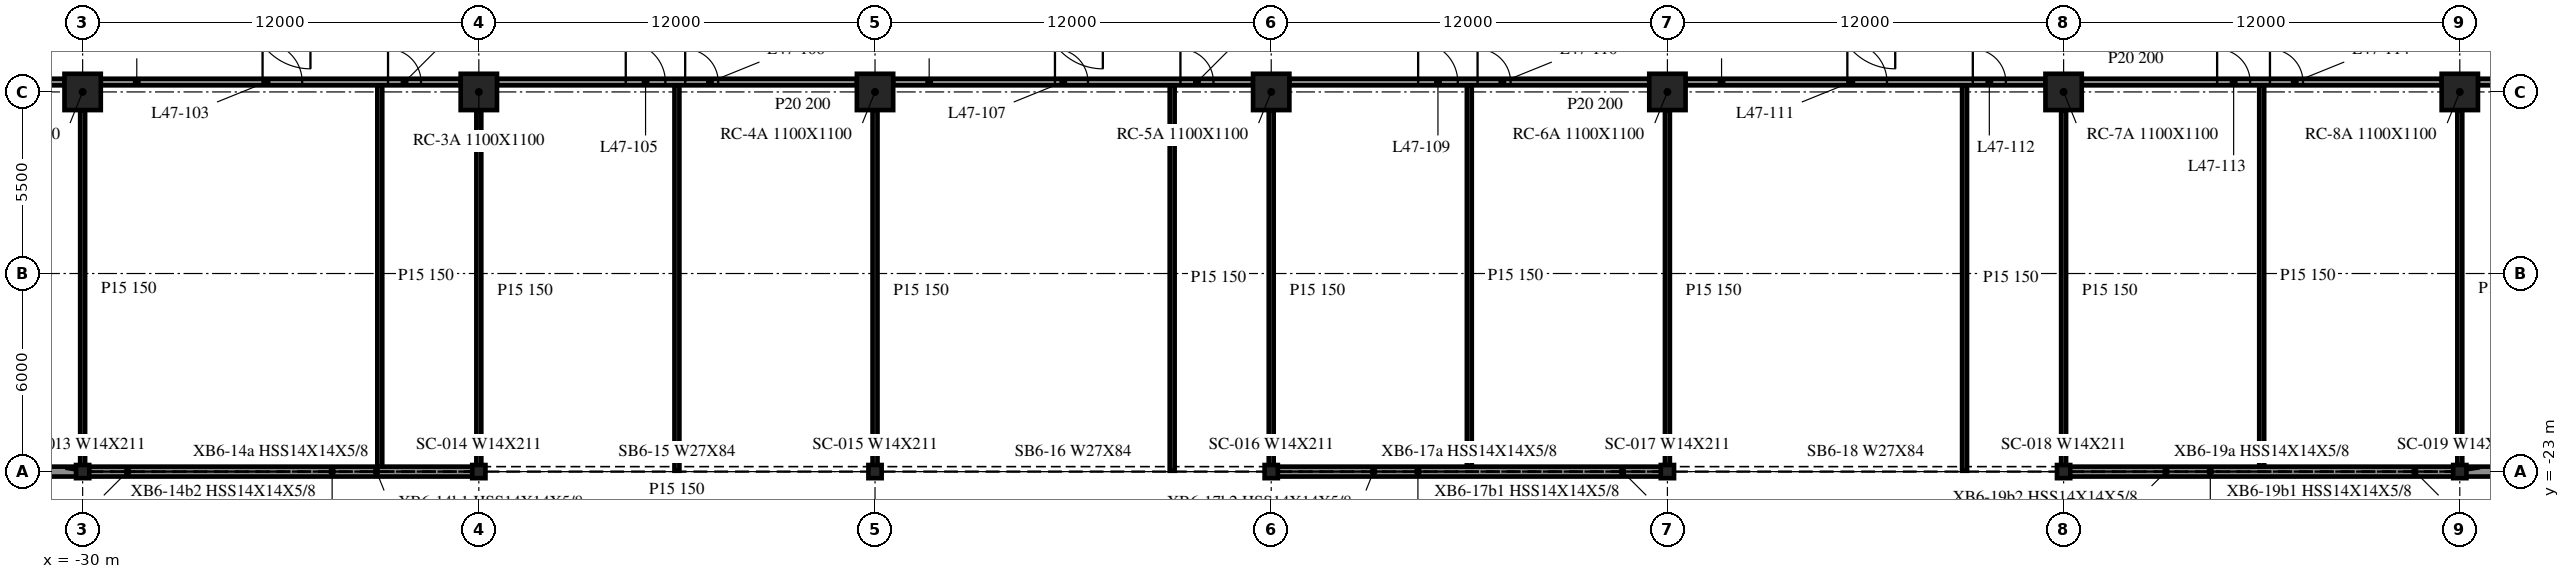
"""IFC4 building model, lengths in metres.
Left out: names, types, materials, properties, quantities, classifications, styles, units other than length and angle.
Written with IfcOpenShell. Run it as: python <this file> out.ifc"""

import sys

from ifc_helpers import new_model, si_unit, direction, frame, frame_2d, origin, origin_2d, place, context, subcontext, project, spatial, rectangle, i_section, extrude, element, fill, save


model = new_model("IFC4")
c1 = context("Model", 3, precision=1e-05, world=origin(), true_north=direction((0.0, 1.0)))
c2 = subcontext(c1, "Body", "Model", "MODEL_VIEW")
j1 = project(units=[si_unit("LENGTHUNIT", "METRE"), si_unit("PLANEANGLEUNIT", "RADIAN")], contexts=[c1])
p1 = place(None, origin())
s1 = spatial("IfcSite", under=j1, at=p1, CompositionType="ELEMENT")
p2 = place(p1, origin())
s2 = spatial("IfcBuilding", under=s1, at=p2, CompositionType="ELEMENT")
p3 = place(p2, frame((0.0, 0.0, 197.7)))
s3 = spatial("IfcBuildingStorey", under=s2, at=p3, CompositionType="ELEMENT", Elevation=197.7)
for number, where, z_axis, x_axis in (
    (1, (-30.0, -11.5, -0.34), (0.0, 0.0, 1.0), (1.0, 0.0, 0.0)),
    (2, (-18.0, -11.5, -0.34), (0.0, 0.0, 1.0), (1.0, 0.0, 0.0)),
    (3, (-6.0, -11.5, -0.34), (0.0, 0.0, 1.0), (1.0, 0.0, 0.0)),
    (4, (6.0, -11.5, -0.34), (0.0, 0.0, 1.0), (1.0, 0.0, 0.0)),
    (5, (18.0, -11.5, -0.34), (0.0, 0.0, 1.0), (1.0, 0.0, 0.0)),
    (6, (30.0, -11.5, -0.34), (0.0, 0.0, 1.0), (1.0, 0.0, 0.0)),
    (7, (42.0, -11.5, -0.34), (0.0, 0.0, 1.0), (1.0, 0.0, 0.0)),
):
    element("IfcColumn", number, at=place(p3, frame(where, z_axis=z_axis, x_axis=x_axis)), inside=s3, PredefinedType="COLUMN", context=c2, shape_type="SweptSolid", body=[
        extrude(rectangle(XDim=1.1, YDim=1.1, at=origin_2d()), origin(), (0.0, 0.0, 1.0), 3.8),
    ])
for number, where, z_axis, x_axis in (
    (8, (-30.0, -23.0, -0.34), (0.0, 0.0, 1.0), (1.0, 0.0, 0.0)),
    (9, (-18.0, -23.0, -0.34), (0.0, 0.0, 1.0), (1.0, 0.0, 0.0)),
    (10, (-6.0, -23.0, -0.34), (0.0, 0.0, 1.0), (1.0, 0.0, 0.0)),
    (11, (6.0, -23.0, -0.34), (0.0, 0.0, 1.0), (1.0, 0.0, 0.0)),
    (12, (18.0, -23.0, -0.34), (0.0, 0.0, 1.0), (1.0, 0.0, 0.0)),
    (13, (30.0, -23.0, -0.34), (0.0, 0.0, 1.0), (1.0, 0.0, 0.0)),
    (14, (42.0, -23.0, -0.34), (0.0, 0.0, 1.0), (1.0, 0.0, 0.0)),
):
    element("IfcColumn", number, at=place(p3, frame(where, z_axis=z_axis, x_axis=x_axis)), inside=s3, PredefinedType="COLUMN", context=c2, shape_type="SweptSolid", body=[
        extrude(i_section(OverallWidth=0.401, OverallDepth=0.399, WebThickness=0.025, FlangeThickness=0.04, at=origin_2d()), origin(), (0.0, 0.0, 1.0), 3.8),
    ])
p4 = place(p3, frame((-36.0, -23.0, 0.0), z_axis=(0.0, 0.0, 1.0), x_axis=(1.0, 0.0, 0.0)))
e15 = element("IfcWall", 15, at=p4, inside=s3, PredefinedType="NOTDEFINED", context=c2, shape_type="SweptSolid", body=[
    extrude(rectangle(XDim=5.988, YDim=0.3, at=frame_2d((2.994, 0.0))), origin(), (0.0, 0.0, 1.0), 2.782),
])
for number, where, z_axis, x_axis in (
    (16, (-29.988, -23.0, 0.0), (0.0, 0.0, 1.0), (1.0, 0.0, 0.0)),
    (17, (6.012, -23.0, 0.0), (0.0, 0.0, 1.0), (1.0, 0.0, 0.0)),
    (18, (30.012, -23.0, 0.0), (0.0, 0.0, 1.0), (1.0, 0.0, 0.0)),
):
    element("IfcWall", number, at=place(p3, frame(where, z_axis=z_axis, x_axis=x_axis)), inside=s3, PredefinedType="NOTDEFINED", context=c2, shape_type="SweptSolid", body=[
        extrude(rectangle(XDim=11.975, YDim=0.3, at=frame_2d((5.988, 0.0))), origin(), (0.0, 0.0, 1.0), 2.782),
    ])
p5 = place(p3, frame((42.012, -23.0, 0.0), z_axis=(0.0, 0.0, 1.0), x_axis=(1.0, 0.0, 0.0)))
e19 = element("IfcWall", 19, at=p5, inside=s3, PredefinedType="NOTDEFINED", context=c2, shape_type="SweptSolid", body=[
    extrude(rectangle(XDim=5.988, YDim=0.3, at=frame_2d((2.994, 0.0))), origin(), (0.0, 0.0, 1.0), 2.782),
])
p6 = place(p3, frame((-41.45, -11.2, 0.0), z_axis=(0.0, 0.0, 1.0), x_axis=(1.0, 0.0, 0.0)))
e20 = element("IfcWall", 20, at=p6, inside=s3, PredefinedType="PARTITIONING", context=c2, shape_type="SweptSolid", body=[
    extrude(rectangle(XDim=10.9, YDim=0.2, at=frame_2d((5.45, 0.0))), origin(), (0.0, 0.0, 1.0), 3.46),
])
p7 = place(p6, frame((4.1, 0.0, 0.0)))
e21 = element("IfcOpeningElement", 21, at=p7, cuts=e20, PredefinedType="OPENING", context=c2, shape_type="SweptSolid", body=[
    extrude(rectangle(XDim=1.0, YDim=2.1, at=frame_2d((0.5, 1.05))), frame((0.0, 0.11, 0.0), z_axis=(0.0, -1.0, 0.0), x_axis=(1.0, 0.0, 0.0)), (0.0, 0.0, 1.0), 0.22),
])
p8 = place(p6, frame((5.7, 0.0, 0.0)))
e22 = element("IfcOpeningElement", 22, at=p8, cuts=e20, PredefinedType="OPENING", context=c2, shape_type="SweptSolid", body=[
    extrude(rectangle(XDim=1.0, YDim=2.1, at=frame_2d((0.5, 1.05))), frame((0.0, 0.11, 0.0), z_axis=(0.0, -1.0, 0.0), x_axis=(1.0, 0.0, 0.0)), (0.0, 0.0, 1.0), 0.22),
])
p9 = place(p3, frame((-29.45, -11.2, 0.0), z_axis=(0.0, 0.0, 1.0), x_axis=(1.0, 0.0, 0.0)))
e23 = element("IfcWall", 23, at=p9, inside=s3, PredefinedType="PARTITIONING", context=c2, shape_type="SweptSolid", body=[
    extrude(rectangle(XDim=10.9, YDim=0.2, at=frame_2d((5.45, 0.0))), origin(), (0.0, 0.0, 1.0), 3.46),
])
p10 = place(p9, frame((4.9, 0.0, 0.0)))
e24 = element("IfcOpeningElement", 24, at=p10, cuts=e23, PredefinedType="OPENING", context=c2, shape_type="SweptSolid", body=[
    extrude(rectangle(XDim=1.2, YDim=2.1, at=frame_2d((0.6, 1.05))), frame((0.0, 0.11, 0.0), z_axis=(0.0, -1.0, 0.0), x_axis=(1.0, 0.0, 0.0)), (0.0, 0.0, 1.0), 0.22),
])
p11 = place(p9, frame((8.7, 0.0, 0.0)))
e25 = element("IfcOpeningElement", 25, at=p11, cuts=e23, PredefinedType="OPENING", context=c2, shape_type="SweptSolid", body=[
    extrude(rectangle(XDim=1.0, YDim=2.1, at=frame_2d((0.5, 1.05))), frame((0.0, 0.11, 0.0), z_axis=(0.0, -1.0, 0.0), x_axis=(1.0, 0.0, 0.0)), (0.0, 0.0, 1.0), 0.22),
])
p12 = place(p3, frame((-17.45, -11.2, 0.0), z_axis=(0.0, 0.0, 1.0), x_axis=(1.0, 0.0, 0.0)))
e26 = element("IfcWall", 26, at=p12, inside=s3, PredefinedType="PARTITIONING", context=c2, shape_type="SweptSolid", body=[
    extrude(rectangle(XDim=10.9, YDim=0.2, at=frame_2d((5.45, 0.0))), origin(), (0.0, 0.0, 1.0), 3.46),
])
p13 = place(p12, frame((3.9, 0.0, 0.0)))
e27 = element("IfcOpeningElement", 27, at=p13, cuts=e26, PredefinedType="OPENING", context=c2, shape_type="SweptSolid", body=[
    extrude(rectangle(XDim=1.2, YDim=2.1, at=frame_2d((0.6, 1.05))), frame((0.0, 0.11, 0.0), z_axis=(0.0, -1.0, 0.0), x_axis=(1.0, 0.0, 0.0)), (0.0, 0.0, 1.0), 0.22),
])
p14 = place(p12, frame((5.7, 0.0, 0.0)))
e28 = element("IfcOpeningElement", 28, at=p14, cuts=e26, PredefinedType="OPENING", context=c2, shape_type="SweptSolid", body=[
    extrude(rectangle(XDim=1.0, YDim=2.1, at=frame_2d((0.5, 1.05))), frame((0.0, 0.11, 0.0), z_axis=(0.0, -1.0, 0.0), x_axis=(1.0, 0.0, 0.0)), (0.0, 0.0, 1.0), 0.22),
])
p15 = place(p3, frame((-5.45, -11.2, 0.0), z_axis=(0.0, 0.0, 1.0), x_axis=(1.0, 0.0, 0.0)))
e29 = element("IfcWall", 29, at=p15, inside=s3, PredefinedType="PARTITIONING", context=c2, shape_type="SweptSolid", body=[
    extrude(rectangle(XDim=10.9, YDim=0.2, at=frame_2d((5.45, 0.0))), origin(), (0.0, 0.0, 1.0), 3.46),
])
p16 = place(p15, frame((4.9, 0.0, 0.0)))
e30 = element("IfcOpeningElement", 30, at=p16, cuts=e29, PredefinedType="OPENING", context=c2, shape_type="SweptSolid", body=[
    extrude(rectangle(XDim=1.0, YDim=2.1, at=frame_2d((0.5, 1.05))), frame((0.0, 0.11, 0.0), z_axis=(0.0, -1.0, 0.0), x_axis=(1.0, 0.0, 0.0)), (0.0, 0.0, 1.0), 0.22),
])
p17 = place(p15, frame((8.7, 0.0, 0.0)))
e31 = element("IfcOpeningElement", 31, at=p17, cuts=e29, PredefinedType="OPENING", context=c2, shape_type="SweptSolid", body=[
    extrude(rectangle(XDim=1.0, YDim=2.1, at=frame_2d((0.5, 1.05))), frame((0.0, 0.11, 0.0), z_axis=(0.0, -1.0, 0.0), x_axis=(1.0, 0.0, 0.0)), (0.0, 0.0, 1.0), 0.22),
])
p18 = place(p3, frame((6.55, -11.2, 0.0), z_axis=(0.0, 0.0, 1.0), x_axis=(1.0, 0.0, 0.0)))
e32 = element("IfcWall", 32, at=p18, inside=s3, PredefinedType="PARTITIONING", context=c2, shape_type="SweptSolid", body=[
    extrude(rectangle(XDim=10.9, YDim=0.2, at=frame_2d((5.45, 0.0))), origin(), (0.0, 0.0, 1.0), 3.46),
])
p19 = place(p18, frame((3.9, 0.0, 0.0)))
e33 = element("IfcOpeningElement", 33, at=p19, cuts=e32, PredefinedType="OPENING", context=c2, shape_type="SweptSolid", body=[
    extrude(rectangle(XDim=1.2, YDim=2.1, at=frame_2d((0.6, 1.05))), frame((0.0, 0.11, 0.0), z_axis=(0.0, -1.0, 0.0), x_axis=(1.0, 0.0, 0.0)), (0.0, 0.0, 1.0), 0.22),
])
p20 = place(p18, frame((5.7, 0.0, 0.0)))
e34 = element("IfcOpeningElement", 34, at=p20, cuts=e32, PredefinedType="OPENING", context=c2, shape_type="SweptSolid", body=[
    extrude(rectangle(XDim=1.0, YDim=2.1, at=frame_2d((0.5, 1.05))), frame((0.0, 0.11, 0.0), z_axis=(0.0, -1.0, 0.0), x_axis=(1.0, 0.0, 0.0)), (0.0, 0.0, 1.0), 0.22),
])
p21 = place(p3, frame((18.55, -11.2, 0.0), z_axis=(0.0, 0.0, 1.0), x_axis=(1.0, 0.0, 0.0)))
e35 = element("IfcWall", 35, at=p21, inside=s3, PredefinedType="PARTITIONING", context=c2, shape_type="SweptSolid", body=[
    extrude(rectangle(XDim=10.9, YDim=0.2, at=frame_2d((5.45, 0.0))), origin(), (0.0, 0.0, 1.0), 3.46),
])
p22 = place(p21, frame((4.9, 0.0, 0.0)))
e36 = element("IfcOpeningElement", 36, at=p22, cuts=e35, PredefinedType="OPENING", context=c2, shape_type="SweptSolid", body=[
    extrude(rectangle(XDim=1.2, YDim=2.1, at=frame_2d((0.6, 1.05))), frame((0.0, 0.11, 0.0), z_axis=(0.0, -1.0, 0.0), x_axis=(1.0, 0.0, 0.0)), (0.0, 0.0, 1.0), 0.22),
])
p23 = place(p21, frame((8.7, 0.0, 0.0)))
e37 = element("IfcOpeningElement", 37, at=p23, cuts=e35, PredefinedType="OPENING", context=c2, shape_type="SweptSolid", body=[
    extrude(rectangle(XDim=1.0, YDim=2.1, at=frame_2d((0.5, 1.05))), frame((0.0, 0.11, 0.0), z_axis=(0.0, -1.0, 0.0), x_axis=(1.0, 0.0, 0.0)), (0.0, 0.0, 1.0), 0.22),
])
p24 = place(p3, frame((30.55, -11.2, 0.0), z_axis=(0.0, 0.0, 1.0), x_axis=(1.0, 0.0, 0.0)))
e38 = element("IfcWall", 38, at=p24, inside=s3, PredefinedType="PARTITIONING", context=c2, shape_type="SweptSolid", body=[
    extrude(rectangle(XDim=10.9, YDim=0.2, at=frame_2d((5.45, 0.0))), origin(), (0.0, 0.0, 1.0), 3.46),
])
p25 = place(p24, frame((4.1, 0.0, 0.0)))
e39 = element("IfcOpeningElement", 39, at=p25, cuts=e38, PredefinedType="OPENING", context=c2, shape_type="SweptSolid", body=[
    extrude(rectangle(XDim=1.0, YDim=2.1, at=frame_2d((0.5, 1.05))), frame((0.0, 0.11, 0.0), z_axis=(0.0, -1.0, 0.0), x_axis=(1.0, 0.0, 0.0)), (0.0, 0.0, 1.0), 0.22),
])
p26 = place(p24, frame((5.7, 0.0, 0.0)))
e40 = element("IfcOpeningElement", 40, at=p26, cuts=e38, PredefinedType="OPENING", context=c2, shape_type="SweptSolid", body=[
    extrude(rectangle(XDim=1.0, YDim=2.1, at=frame_2d((0.5, 1.05))), frame((0.0, 0.11, 0.0), z_axis=(0.0, -1.0, 0.0), x_axis=(1.0, 0.0, 0.0)), (0.0, 0.0, 1.0), 0.22),
])
p27 = place(p3, frame((42.55, -11.2, 0.0), z_axis=(0.0, 0.0, 1.0), x_axis=(1.0, 0.0, 0.0)))
e41 = element("IfcWall", 41, at=p27, inside=s3, PredefinedType="PARTITIONING", context=c2, shape_type="SweptSolid", body=[
    extrude(rectangle(XDim=11.3, YDim=0.2, at=frame_2d((5.65, 0.0))), origin(), (0.0, 0.0, 1.0), 3.46),
])
p28 = place(p27, frame((5.1, 0.0, 0.0)))
e42 = element("IfcOpeningElement", 42, at=p28, cuts=e41, PredefinedType="OPENING", context=c2, shape_type="SweptSolid", body=[
    extrude(rectangle(XDim=1.2, YDim=2.1, at=frame_2d((0.6, 1.05))), frame((0.0, 0.11, 0.0), z_axis=(0.0, -1.0, 0.0), x_axis=(1.0, 0.0, 0.0)), (0.0, 0.0, 1.0), 0.22),
])
p29 = place(p3, frame((-30.0, -22.85, 0.0), z_axis=(0.0, 0.0, 1.0), x_axis=(0.0, 1.0, 0.0)))
e43 = element("IfcWall", 43, at=p29, inside=s3, PredefinedType="PARTITIONING", context=c2, shape_type="SweptSolid", body=[
    extrude(rectangle(XDim=10.8, YDim=0.15, at=frame_2d((5.4, 0.0))), origin(), (0.0, 0.0, 1.0), 3.46),
])
p30 = place(p3, frame((-21.0, -22.85, 0.0), z_axis=(0.0, 0.0, 1.0), x_axis=(0.0, 1.0, 0.0)))
e44 = element("IfcWall", 44, at=p30, inside=s3, PredefinedType="PARTITIONING", context=c2, shape_type="SweptSolid", body=[
    extrude(rectangle(XDim=11.55, YDim=0.15, at=frame_2d((5.775, 0.0))), origin(), (0.0, 0.0, 1.0), 3.46),
])
p31 = place(p3, frame((-18.0, -22.975, 0.0), z_axis=(0.0, 0.0, 1.0), x_axis=(0.0, 1.0, 0.0)))
e45 = element("IfcWall", 45, at=p31, inside=s3, PredefinedType="PARTITIONING", context=c2, shape_type="SweptSolid", body=[
    extrude(rectangle(XDim=10.925, YDim=0.15, at=frame_2d((5.462, 0.0))), origin(), (0.0, 0.0, 1.0), 3.46),
])
p32 = place(p3, frame((-12.0, -22.975, 0.0), z_axis=(0.0, 0.0, 1.0), x_axis=(0.0, 1.0, 0.0)))
e46 = element("IfcWall", 46, at=p32, inside=s3, PredefinedType="PARTITIONING", context=c2, shape_type="SweptSolid", body=[
    extrude(rectangle(XDim=11.675, YDim=0.15, at=frame_2d((5.837, 0.0))), origin(), (0.0, 0.0, 1.0), 3.46),
])
p33 = place(p3, frame((-6.0, -22.975, 0.0), z_axis=(0.0, 0.0, 1.0), x_axis=(0.0, 1.0, 0.0)))
e47 = element("IfcWall", 47, at=p33, inside=s3, PredefinedType="PARTITIONING", context=c2, shape_type="SweptSolid", body=[
    extrude(rectangle(XDim=10.925, YDim=0.15, at=frame_2d((5.462, 0.0))), origin(), (0.0, 0.0, 1.0), 3.46),
])
p34 = place(p3, frame((3.0, -22.975, 0.0), z_axis=(0.0, 0.0, 1.0), x_axis=(0.0, 1.0, 0.0)))
e48 = element("IfcWall", 48, at=p34, inside=s3, PredefinedType="PARTITIONING", context=c2, shape_type="SweptSolid", body=[
    extrude(rectangle(XDim=11.675, YDim=0.15, at=frame_2d((5.837, 0.0))), origin(), (0.0, 0.0, 1.0), 3.46),
])
p35 = place(p3, frame((6.0, -22.975, 0.0), z_axis=(0.0, 0.0, 1.0), x_axis=(0.0, 1.0, 0.0)))
e49 = element("IfcWall", 49, at=p35, inside=s3, PredefinedType="PARTITIONING", context=c2, shape_type="SweptSolid", body=[
    extrude(rectangle(XDim=10.925, YDim=0.15, at=frame_2d((5.462, 0.0))), origin(), (0.0, 0.0, 1.0), 3.46),
])
p36 = place(p3, frame((12.0, -22.85, 0.0), z_axis=(0.0, 0.0, 1.0), x_axis=(0.0, 1.0, 0.0)))
e50 = element("IfcWall", 50, at=p36, inside=s3, PredefinedType="PARTITIONING", context=c2, shape_type="SweptSolid", body=[
    extrude(rectangle(XDim=11.55, YDim=0.15, at=frame_2d((5.775, 0.0))), origin(), (0.0, 0.0, 1.0), 3.46),
])
p37 = place(p3, frame((18.0, -22.975, 0.0), z_axis=(0.0, 0.0, 1.0), x_axis=(0.0, 1.0, 0.0)))
e51 = element("IfcWall", 51, at=p37, inside=s3, PredefinedType="PARTITIONING", context=c2, shape_type="SweptSolid", body=[
    extrude(rectangle(XDim=10.925, YDim=0.15, at=frame_2d((5.462, 0.0))), origin(), (0.0, 0.0, 1.0), 3.46),
])
p38 = place(p3, frame((27.0, -22.975, 0.0), z_axis=(0.0, 0.0, 1.0), x_axis=(0.0, 1.0, 0.0)))
e52 = element("IfcWall", 52, at=p38, inside=s3, PredefinedType="PARTITIONING", context=c2, shape_type="SweptSolid", body=[
    extrude(rectangle(XDim=11.675, YDim=0.15, at=frame_2d((5.837, 0.0))), origin(), (0.0, 0.0, 1.0), 3.46),
])
p39 = place(p3, frame((30.0, -22.975, 0.0), z_axis=(0.0, 0.0, 1.0), x_axis=(0.0, 1.0, 0.0)))
e53 = element("IfcWall", 53, at=p39, inside=s3, PredefinedType="PARTITIONING", context=c2, shape_type="SweptSolid", body=[
    extrude(rectangle(XDim=10.925, YDim=0.15, at=frame_2d((5.462, 0.0))), origin(), (0.0, 0.0, 1.0), 3.46),
])
p40 = place(p3, frame((36.0, -22.85, 0.0), z_axis=(0.0, 0.0, 1.0), x_axis=(0.0, 1.0, 0.0)))
e54 = element("IfcWall", 54, at=p40, inside=s3, PredefinedType="PARTITIONING", context=c2, shape_type="SweptSolid", body=[
    extrude(rectangle(XDim=11.55, YDim=0.15, at=frame_2d((5.775, 0.0))), origin(), (0.0, 0.0, 1.0), 3.46),
])
p41 = place(p3, frame((42.0, -22.85, 0.0), z_axis=(0.0, 0.0, 1.0), x_axis=(0.0, 1.0, 0.0)))
e55 = element("IfcWall", 55, at=p41, inside=s3, PredefinedType="PARTITIONING", context=c2, shape_type="SweptSolid", body=[
    extrude(rectangle(XDim=10.8, YDim=0.15, at=frame_2d((5.4, 0.0))), origin(), (0.0, 0.0, 1.0), 3.46),
])
p42 = place(p10, origin())
e56 = element("IfcDoor", 56, at=p42, inside=s3, OperationType="SINGLE_SWING_LEFT", PredefinedType="DOOR", context=c2, shape_type="SweptSolid", body=[
    extrude(rectangle(XDim=1.2, YDim=2.1, at=frame_2d((0.6, 1.05))), frame((0.0, 0.025, 0.0), z_axis=(0.0, -1.0, 0.0), x_axis=(1.0, 0.0, 0.0)), (0.0, 0.0, 1.0), 0.05),
])
fill(e24, e56)
p43 = place(p11, origin())
e57 = element("IfcDoor", 57, at=p43, inside=s3, OperationType="SINGLE_SWING_LEFT", PredefinedType="DOOR", context=c2, shape_type="SweptSolid", body=[
    extrude(rectangle(XDim=1.0, YDim=2.1, at=frame_2d((0.5, 1.05))), frame((0.0, 0.025, 0.0), z_axis=(0.0, -1.0, 0.0), x_axis=(1.0, 0.0, 0.0)), (0.0, 0.0, 1.0), 0.05),
])
fill(e25, e57)
p44 = place(p13, origin())
e58 = element("IfcDoor", 58, at=p44, inside=s3, OperationType="SINGLE_SWING_RIGHT", PredefinedType="DOOR", context=c2, shape_type="SweptSolid", body=[
    extrude(rectangle(XDim=1.2, YDim=2.1, at=frame_2d((0.6, 1.05))), frame((0.0, 0.025, 0.0), z_axis=(0.0, -1.0, 0.0), x_axis=(1.0, 0.0, 0.0)), (0.0, 0.0, 1.0), 0.05),
])
fill(e27, e58)
p45 = place(p14, origin())
e59 = element("IfcDoor", 59, at=p45, inside=s3, OperationType="SINGLE_SWING_LEFT", PredefinedType="DOOR", context=c2, shape_type="SweptSolid", body=[
    extrude(rectangle(XDim=1.0, YDim=2.1, at=frame_2d((0.5, 1.05))), frame((0.0, 0.025, 0.0), z_axis=(0.0, -1.0, 0.0), x_axis=(1.0, 0.0, 0.0)), (0.0, 0.0, 1.0), 0.05),
])
fill(e28, e59)
p46 = place(p16, origin())
e60 = element("IfcDoor", 60, at=p46, inside=s3, OperationType="SINGLE_SWING_RIGHT", PredefinedType="DOOR", context=c2, shape_type="SweptSolid", body=[
    extrude(rectangle(XDim=1.0, YDim=2.1, at=frame_2d((0.5, 1.05))), frame((0.0, 0.025, 0.0), z_axis=(0.0, -1.0, 0.0), x_axis=(1.0, 0.0, 0.0)), (0.0, 0.0, 1.0), 0.05),
])
fill(e30, e60)
p47 = place(p17, origin())
e61 = element("IfcDoor", 61, at=p47, inside=s3, OperationType="SINGLE_SWING_LEFT", PredefinedType="DOOR", context=c2, shape_type="SweptSolid", body=[
    extrude(rectangle(XDim=1.0, YDim=2.1, at=frame_2d((0.5, 1.05))), frame((0.0, 0.025, 0.0), z_axis=(0.0, -1.0, 0.0), x_axis=(1.0, 0.0, 0.0)), (0.0, 0.0, 1.0), 0.05),
])
fill(e31, e61)
p48 = place(p19, origin())
e62 = element("IfcDoor", 62, at=p48, inside=s3, OperationType="SINGLE_SWING_RIGHT", PredefinedType="DOOR", context=c2, shape_type="SweptSolid", body=[
    extrude(rectangle(XDim=1.2, YDim=2.1, at=frame_2d((0.6, 1.05))), frame((0.0, 0.025, 0.0), z_axis=(0.0, -1.0, 0.0), x_axis=(1.0, 0.0, 0.0)), (0.0, 0.0, 1.0), 0.05),
])
fill(e33, e62)
p49 = place(p20, origin())
e63 = element("IfcDoor", 63, at=p49, inside=s3, OperationType="SINGLE_SWING_LEFT", PredefinedType="DOOR", context=c2, shape_type="SweptSolid", body=[
    extrude(rectangle(XDim=1.0, YDim=2.1, at=frame_2d((0.5, 1.05))), frame((0.0, 0.025, 0.0), z_axis=(0.0, -1.0, 0.0), x_axis=(1.0, 0.0, 0.0)), (0.0, 0.0, 1.0), 0.05),
])
fill(e34, e63)
p50 = place(p22, origin())
e64 = element("IfcDoor", 64, at=p50, inside=s3, OperationType="SINGLE_SWING_LEFT", PredefinedType="DOOR", context=c2, shape_type="SweptSolid", body=[
    extrude(rectangle(XDim=1.2, YDim=2.1, at=frame_2d((0.6, 1.05))), frame((0.0, 0.025, 0.0), z_axis=(0.0, -1.0, 0.0), x_axis=(1.0, 0.0, 0.0)), (0.0, 0.0, 1.0), 0.05),
])
fill(e36, e64)
p51 = place(p23, origin())
e65 = element("IfcDoor", 65, at=p51, inside=s3, OperationType="SINGLE_SWING_LEFT", PredefinedType="DOOR", context=c2, shape_type="SweptSolid", body=[
    extrude(rectangle(XDim=1.0, YDim=2.1, at=frame_2d((0.5, 1.05))), frame((0.0, 0.025, 0.0), z_axis=(0.0, -1.0, 0.0), x_axis=(1.0, 0.0, 0.0)), (0.0, 0.0, 1.0), 0.05),
])
fill(e37, e65)
p52 = place(p25, origin())
e66 = element("IfcDoor", 66, at=p52, inside=s3, OperationType="SINGLE_SWING_RIGHT", PredefinedType="DOOR", context=c2, shape_type="SweptSolid", body=[
    extrude(rectangle(XDim=1.0, YDim=2.1, at=frame_2d((0.5, 1.05))), frame((0.0, 0.025, 0.0), z_axis=(0.0, -1.0, 0.0), x_axis=(1.0, 0.0, 0.0)), (0.0, 0.0, 1.0), 0.05),
])
fill(e39, e66)
p53 = place(p26, origin())
e67 = element("IfcDoor", 67, at=p53, inside=s3, OperationType="SINGLE_SWING_LEFT", PredefinedType="DOOR", context=c2, shape_type="SweptSolid", body=[
    extrude(rectangle(XDim=1.0, YDim=2.1, at=frame_2d((0.5, 1.05))), frame((0.0, 0.025, 0.0), z_axis=(0.0, -1.0, 0.0), x_axis=(1.0, 0.0, 0.0)), (0.0, 0.0, 1.0), 0.05),
])
fill(e40, e67)
save(model, sys.argv[1])
